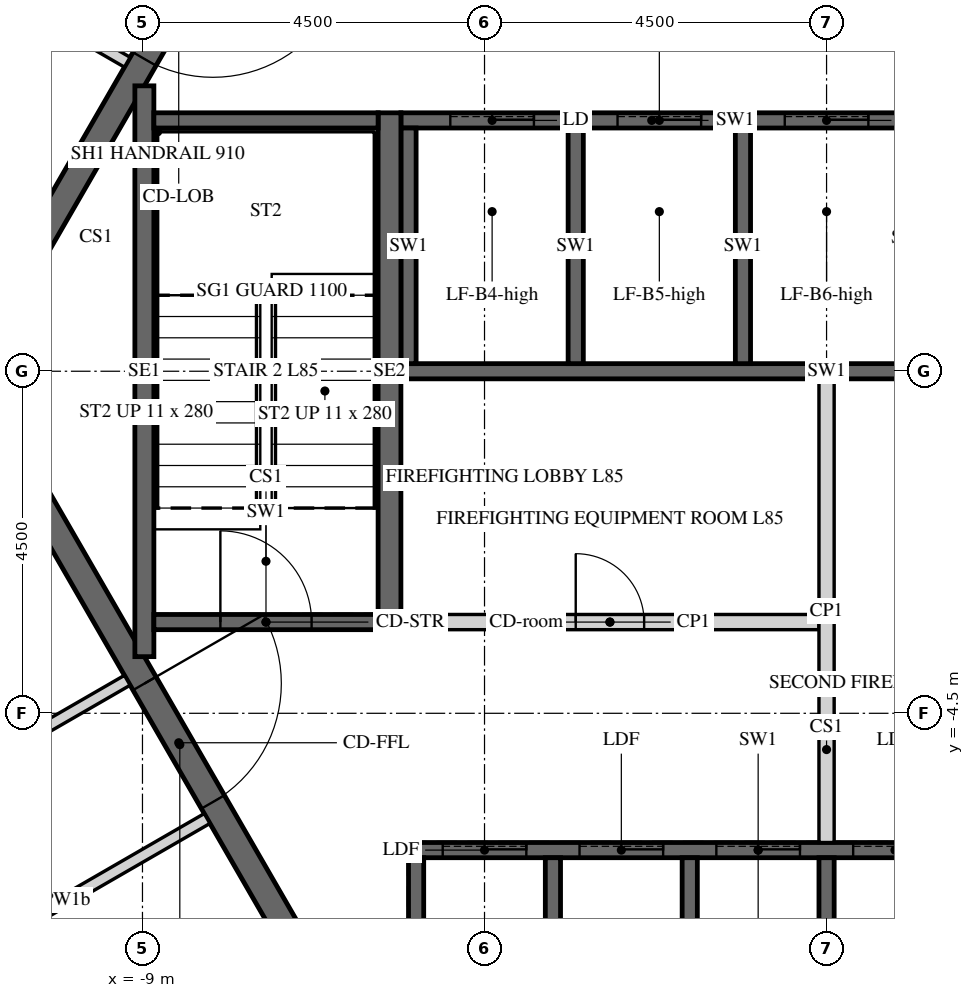
"""IFC4 building model, lengths in metres.
Left out: names, types, materials, properties, quantities, classifications, styles, units other than length and angle.
Written with IfcOpenShell. Run it as: python <this file> out.ifc"""

import sys

from ifc_helpers import new_model, si_unit, direction, frame, frame_2d, origin, place, context, subcontext, project, spatial, polyline, rectangle, outline, extrude, element, fill, save


model = new_model("IFC4")
c1 = context("Model", 3, precision=1e-05, world=origin(), true_north=direction((0.0, 1.0)))
c2 = subcontext(c1, "Body", "Model", "MODEL_VIEW")
j1 = project(units=[si_unit("LENGTHUNIT", "METRE"), si_unit("PLANEANGLEUNIT", "RADIAN")], contexts=[c1])
p1 = place(None, origin())
s1 = spatial("IfcSite", under=j1, at=p1, CompositionType="ELEMENT")
p2 = place(p1, origin())
s2 = spatial("IfcBuilding", under=s1, at=p2, CompositionType="ELEMENT")
p3 = place(p2, frame((0.0, 0.0, 353.4)))
s3 = spatial("IfcBuildingStorey", under=s2, at=p3, CompositionType="ELEMENT", Elevation=353.4)
p4 = place(p3, frame((-5.673, 9.825, -0.15), z_axis=(0.0, 0.0, 1.0), x_axis=(-0.499995046907, -0.866028263435, 0.0)))
e1 = element("IfcWall", 1, at=p4, inside=s3, PredefinedType="SHEAR", context=c2, shape_type="SweptSolid", body=[
    extrude(outline(polyline([(-0.101, -0.175), (11.446, -0.175), (11.244, 0.175), (0.101, 0.175), (-0.101, -0.175)])), origin(), (0.0, 0.0, 1.0), 3.9),
])
p5 = place(p4, frame((4.801, 0.0, 0.15)))
e2 = element("IfcOpeningElement", 2, at=p5, cuts=e1, PredefinedType="OPENING", context=c2, shape_type="SweptSolid", body=[
    extrude(rectangle(XDim=1.8, YDim=2.4, at=frame_2d((0.9, 1.2))), frame((0.0, 0.185, 0.0), z_axis=(0.0, -1.0, 0.0), x_axis=(1.0, 0.0, 0.0)), (0.0, 0.0, 1.0), 0.37),
])
p6 = place(p3, frame((-11.345, 0.0, -0.15), z_axis=(0.0, 0.0, 1.0), x_axis=(0.499995046907, -0.866028263435, 0.0)))
e3 = element("IfcWall", 3, at=p6, inside=s3, PredefinedType="SHEAR", context=c2, shape_type="SweptSolid", body=[
    extrude(outline(polyline([(-0.101, -0.175), (11.446, -0.175), (11.244, 0.175), (0.101, 0.175), (-0.101, -0.175)])), origin(), (0.0, 0.0, 1.0), 3.9),
])
p7 = place(p6, frame((4.744, 0.0, 0.15)))
e4 = element("IfcOpeningElement", 4, at=p7, cuts=e3, PredefinedType="OPENING", context=c2, shape_type="SweptSolid", body=[
    extrude(rectangle(XDim=1.8, YDim=2.4, at=frame_2d((0.9, 1.2))), frame((0.0, 0.185, 0.0), z_axis=(0.0, -1.0, 0.0), x_axis=(1.0, 0.0, 0.0)), (0.0, 0.0, 1.0), 0.37),
])
p8 = place(p3, frame((-5.6, 3.3, -0.25), z_axis=(0.0, 0.0, 1.0), x_axis=(1.0, 0.0, 0.0)))
e5 = element("IfcWall", 5, at=p8, inside=s3, PredefinedType="SHEAR", context=c2, shape_type="SweptSolid", body=[
    extrude(rectangle(XDim=6.6, YDim=0.2, at=frame_2d((3.3, 0.0))), origin(), (0.0, 0.0, 1.0), 3.9),
])
p9 = place(p8, frame((0.65, 0.0, 0.25)))
e6 = element("IfcOpeningElement", 6, at=p9, cuts=e5, PredefinedType="OPENING", context=c2, shape_type="SweptSolid", body=[
    extrude(rectangle(XDim=1.1, YDim=2.1, at=frame_2d((0.55, 1.05))), frame((0.0, 0.11, 0.0), z_axis=(0.0, -1.0, 0.0), x_axis=(1.0, 0.0, 0.0)), (0.0, 0.0, 1.0), 0.22),
])
p10 = place(p8, frame((2.85, 0.0, 0.25)))
e7 = element("IfcOpeningElement", 7, at=p10, cuts=e5, PredefinedType="OPENING", context=c2, shape_type="SweptSolid", body=[
    extrude(rectangle(XDim=1.1, YDim=2.1, at=frame_2d((0.55, 1.05))), frame((0.0, 0.11, 0.0), z_axis=(0.0, -1.0, 0.0), x_axis=(1.0, 0.0, 0.0)), (0.0, 0.0, 1.0), 0.22),
])
p11 = place(p8, frame((5.05, 0.0, 0.25)))
e8 = element("IfcOpeningElement", 8, at=p11, cuts=e5, PredefinedType="OPENING", context=c2, shape_type="SweptSolid", body=[
    extrude(rectangle(XDim=1.1, YDim=2.1, at=frame_2d((0.55, 1.05))), frame((0.0, 0.11, 0.0), z_axis=(0.0, -1.0, 0.0), x_axis=(1.0, 0.0, 0.0)), (0.0, 0.0, 1.0), 0.22),
])
p12 = place(p3, frame((-5.6, 0.0, -0.25), z_axis=(0.0, 0.0, 1.0), x_axis=(1.0, 0.0, 0.0)))
e9 = element("IfcWall", 9, at=p12, inside=s3, PredefinedType="SHEAR", context=c2, shape_type="SweptSolid", body=[
    extrude(rectangle(XDim=11.2, YDim=0.2, at=frame_2d((5.6, 0.0))), origin(), (0.0, 0.0, 1.0), 3.9),
])
for number, where, z_axis, x_axis in (
    (10, (-5.5, 0.1, -0.25), (0.0, 0.0, 1.0), (0.0, 1.0, 0.0)),
    (11, (-3.3, 0.1, -0.25), (0.0, 0.0, 1.0), (0.0, 1.0, 0.0)),
    (12, (-1.1, 0.1, -0.25), (0.0, 0.0, 1.0), (0.0, 1.0, 0.0)),
):
    element("IfcWall", number, at=place(p3, frame(where, z_axis=z_axis, x_axis=x_axis)), inside=s3, PredefinedType="SHEAR", context=c2, shape_type="SweptSolid", body=[
        extrude(rectangle(XDim=3.1, YDim=0.2, at=frame_2d((1.55, 0.0))), origin(), (0.0, 0.0, 1.0), 3.9),
    ])
p13 = place(p3, frame((-5.5, -6.3, -0.25), z_axis=(0.0, 0.0, 1.0), x_axis=(1.0, 0.0, 0.0)))
e13 = element("IfcWall", 13, at=p13, inside=s3, PredefinedType="SHEAR", context=c2, shape_type="SweptSolid", body=[
    extrude(rectangle(XDim=9.2, YDim=0.2, at=frame_2d((4.6, 0.0))), origin(), (0.0, 0.0, 1.0), 3.9),
])
p14 = place(p13, frame((0.45, 0.0, 0.25)))
e14 = element("IfcOpeningElement", 14, at=p14, cuts=e13, PredefinedType="OPENING", context=c2, shape_type="SweptSolid", body=[
    extrude(rectangle(XDim=1.1, YDim=2.1, at=frame_2d((0.55, 1.05))), frame((0.0, 0.11, 0.0), z_axis=(0.0, -1.0, 0.0), x_axis=(1.0, 0.0, 0.0)), (0.0, 0.0, 1.0), 0.22),
])
p15 = place(p13, frame((2.25, 0.0, 0.25)))
e15 = element("IfcOpeningElement", 15, at=p15, cuts=e13, PredefinedType="OPENING", context=c2, shape_type="SweptSolid", body=[
    extrude(rectangle(XDim=1.1, YDim=2.1, at=frame_2d((0.55, 1.05))), frame((0.0, 0.11, 0.0), z_axis=(0.0, -1.0, 0.0), x_axis=(1.0, 0.0, 0.0)), (0.0, 0.0, 1.0), 0.22),
])
p16 = place(p13, frame((4.05, 0.0, 0.25)))
e16 = element("IfcOpeningElement", 16, at=p16, cuts=e13, PredefinedType="OPENING", context=c2, shape_type="SweptSolid", body=[
    extrude(rectangle(XDim=1.1, YDim=2.1, at=frame_2d((0.55, 1.05))), frame((0.0, 0.11, 0.0), z_axis=(0.0, -1.0, 0.0), x_axis=(1.0, 0.0, 0.0)), (0.0, 0.0, 1.0), 0.22),
])
p17 = place(p13, frame((5.85, 0.0, 0.25)))
e17 = element("IfcOpeningElement", 17, at=p17, cuts=e13, PredefinedType="OPENING", context=c2, shape_type="SweptSolid", body=[
    extrude(rectangle(XDim=1.1, YDim=2.1, at=frame_2d((0.55, 1.05))), frame((0.0, 0.11, 0.0), z_axis=(0.0, -1.0, 0.0), x_axis=(1.0, 0.0, 0.0)), (0.0, 0.0, 1.0), 0.22),
])
p18 = place(p13, frame((7.65, 0.0, 0.25)))
e18 = element("IfcOpeningElement", 18, at=p18, cuts=e13, PredefinedType="OPENING", context=c2, shape_type="SweptSolid", body=[
    extrude(rectangle(XDim=1.1, YDim=2.1, at=frame_2d((0.55, 1.05))), frame((0.0, 0.11, 0.0), z_axis=(0.0, -1.0, 0.0), x_axis=(1.0, 0.0, 0.0)), (0.0, 0.0, 1.0), 0.22),
])
for number, where, z_axis, x_axis in (
    (19, (-5.4, -9.3, -0.25), (0.0, 0.0, 1.0), (0.0, 1.0, 0.0)),
    (20, (-3.6, -9.3, -0.25), (0.0, 0.0, 1.0), (0.0, 1.0, 0.0)),
    (21, (-1.8, -9.3, -0.25), (0.0, 0.0, 1.0), (0.0, 1.0, 0.0)),
    (22, (0.0, -9.3, -0.25), (0.0, 0.0, 1.0), (0.0, 1.0, 0.0)),
):
    element("IfcWall", number, at=place(p3, frame(where, z_axis=z_axis, x_axis=x_axis)), inside=s3, PredefinedType="SHEAR", context=c2, shape_type="SweptSolid", body=[
        extrude(rectangle(XDim=2.9, YDim=0.2, at=frame_2d((1.45, 0.0))), origin(), (0.0, 0.0, 1.0), 3.9),
    ])
p19 = place(p3, frame((-5.6, -3.3, 0.0), z_axis=(0.0, 0.0, 1.0), x_axis=(1.0, 0.0, 0.0)))
e23 = element("IfcWall", 23, at=p19, inside=s3, PredefinedType="PARTITIONING", context=c2, shape_type="SweptSolid", body=[
    extrude(rectangle(XDim=5.5, YDim=0.2, at=frame_2d((2.75, 0.0))), origin(), (0.0, 0.0, 1.0), 3.65),
])
p20 = place(p19, frame((2.3, 0.0, 0.0)))
e24 = element("IfcOpeningElement", 24, at=p20, cuts=e23, PredefinedType="OPENING", context=c2, shape_type="SweptSolid", body=[
    extrude(rectangle(XDim=0.9, YDim=2.1, at=frame_2d((0.45, 1.05))), frame((0.0, 0.11, 0.0), z_axis=(0.0, -1.0, 0.0), x_axis=(1.0, 0.0, 0.0)), (0.0, 0.0, 1.0), 0.22),
])
p21 = place(p3, frame((0.0, -6.2, 0.0), z_axis=(0.0, 0.0, 1.0), x_axis=(0.0, 1.0, 0.0)))
e25 = element("IfcWall", 25, at=p21, inside=s3, PredefinedType="PARTITIONING", context=c2, shape_type="SweptSolid", body=[
    extrude(rectangle(XDim=6.1, YDim=0.2, at=frame_2d((3.05, 0.0))), origin(), (0.0, 0.0, 1.0), 3.65),
])
p22 = place(p3, frame((-5.75, -3.4, -0.25), z_axis=(0.0, 0.0, 1.0), x_axis=(0.0, 1.0, 0.0)))
e26 = element("IfcWall", 26, at=p22, inside=s3, PredefinedType="SHEAR", context=c2, shape_type="SweptSolid", body=[
    extrude(rectangle(XDim=6.8, YDim=0.3, at=frame_2d((3.4, 0.0))), origin(), (0.0, 0.0, 1.0), 3.9),
])
p23 = place(p3, frame((-8.975, -3.755, -0.25), z_axis=(0.0, 0.0, 1.0), x_axis=(0.0, 1.0, 0.0)))
e27 = element("IfcWall", 27, at=p23, inside=s3, PredefinedType="SHEAR", context=c2, shape_type="SweptSolid", body=[
    extrude(rectangle(XDim=7.51, YDim=0.25, at=frame_2d((3.755, 0.0))), origin(), (0.0, 0.0, 1.0), 3.9),
])
p24 = place(p3, frame((-8.85, 3.3, -0.25), z_axis=(0.0, 0.0, 1.0), x_axis=(1.0, 0.0, 0.0)))
e28 = element("IfcWall", 28, at=p24, inside=s3, PredefinedType="SHEAR", context=c2, shape_type="SweptSolid", body=[
    extrude(rectangle(XDim=2.95, YDim=0.2, at=frame_2d((1.475, 0.0))), origin(), (0.0, 0.0, 1.0), 3.9),
])
p25 = place(p3, frame((-8.85, -3.3, -0.25), z_axis=(0.0, 0.0, 1.0), x_axis=(1.0, 0.0, 0.0)))
e29 = element("IfcWall", 29, at=p25, inside=s3, PredefinedType="SHEAR", context=c2, shape_type="SweptSolid", body=[
    extrude(rectangle(XDim=2.95, YDim=0.2, at=frame_2d((1.475, 0.0))), origin(), (0.0, 0.0, 1.0), 3.9),
])
p26 = place(p25, frame((0.875, 0.0, 0.25)))
e30 = element("IfcOpeningElement", 30, at=p26, cuts=e29, PredefinedType="OPENING", context=c2, shape_type="SweptSolid", body=[
    extrude(rectangle(XDim=1.2, YDim=2.4, at=frame_2d((0.6, 1.2))), frame((0.0, 0.11, 0.0), z_axis=(0.0, -1.0, 0.0), x_axis=(1.0, 0.0, 0.0)), (0.0, 0.0, 1.0), 0.22),
])
p27 = place(p3, frame((-7.903, 16.075, 0.0), z_axis=(0.0, 0.0, 1.0), x_axis=(-0.438364761272, -0.898797160696, 0.0)))
e31 = element("IfcWall", 31, at=p27, inside=s3, PredefinedType="PARTITIONING", context=c2, shape_type="SweptSolid", body=[
    extrude(rectangle(XDim=15.688, YDim=0.15, at=frame_2d((7.844, 0.0))), origin(), (0.0, 0.0, 1.0), 2.82),
])
p28 = place(p27, frame((2.942, 0.0, 0.0)))
e32 = element("IfcOpeningElement", 32, at=p28, cuts=e31, PredefinedType="OPENING", context=c2, shape_type="SweptSolid", body=[
    extrude(rectangle(XDim=1.0, YDim=2.1, at=frame_2d((0.5, 1.05))), frame((0.0, 0.085, 0.0), z_axis=(0.0, -1.0, 0.0), x_axis=(1.0, 0.0, 0.0)), (0.0, 0.0, 1.0), 0.17),
])
p29 = place(p3, frame((-11.131, 5.18, 0.0), z_axis=(0.0, 0.0, 1.0), x_axis=(0.866037886895, -0.499978377995, 0.0)))
e33 = element("IfcWall", 33, at=p29, inside=s3, PredefinedType="PARTITIONING", context=c2, shape_type="SweptSolid", body=[
    extrude(rectangle(XDim=2.229, YDim=0.15, at=frame_2d((1.115, 0.0))), origin(), (0.0, 0.0, 1.0), 2.82),
])
p30 = place(p3, frame((-17.036, -2.792, 0.0), z_axis=(0.0, 0.0, 1.0), x_axis=(0.500006428338, -0.86602169235, 0.0)))
e34 = element("IfcWall", 34, at=p30, inside=s3, PredefinedType="PARTITIONING", context=c2, shape_type="SweptSolid", body=[
    extrude(rectangle(XDim=13.966, YDim=0.15, at=frame_2d((6.983, 0.0))), origin(), (0.0, 0.0, 1.0), 2.82),
])
p31 = place(p30, frame((3.325, 0.0, 0.0)))
e35 = element("IfcOpeningElement", 35, at=p31, cuts=e34, PredefinedType="OPENING", context=c2, shape_type="SweptSolid", body=[
    extrude(rectangle(XDim=1.0, YDim=2.1, at=frame_2d((0.5, 1.05))), frame((0.0, 0.085, 0.0), z_axis=(0.0, -1.0, 0.0), x_axis=(1.0, 0.0, 0.0)), (0.0, 0.0, 1.0), 0.17),
])
p32 = place(p3, frame((-9.2, -4.066, 0.0), z_axis=(0.0, 0.0, 1.0), x_axis=(-0.866013608182, -0.500020430026, 0.0)))
e36 = element("IfcWall", 36, at=p32, inside=s3, PredefinedType="PARTITIONING", context=c2, shape_type="SweptSolid", body=[
    extrude(rectangle(XDim=4.35, YDim=0.15, at=frame_2d((2.175, 0.0))), origin(), (0.0, 0.0, 1.0), 2.82),
])
p33 = place(p32, frame((1.725, 0.0, 0.0)))
e37 = element("IfcOpeningElement", 37, at=p33, cuts=e36, PredefinedType="OPENING", context=c2, shape_type="SweptSolid", body=[
    extrude(rectangle(XDim=0.9, YDim=2.1, at=frame_2d((0.45, 1.05))), frame((0.0, 0.085, 0.0), z_axis=(0.0, -1.0, 0.0), x_axis=(1.0, 0.0, 0.0)), (0.0, 0.0, 1.0), 0.17),
])
p34 = place(p3, frame((-11.852, -8.022, 0.0), z_axis=(0.0, 0.0, 1.0), x_axis=(0.866038183914, 0.499977863513, 0.0)))
e38 = element("IfcWall", 38, at=p34, inside=s3, PredefinedType="PARTITIONING", context=c2, shape_type="SweptSolid", body=[
    extrude(rectangle(XDim=4.275, YDim=0.15, at=frame_2d((2.138, 0.0))), origin(), (0.0, 0.0, 1.0), 2.82),
])
p35 = place(p5, origin())
e39 = element("IfcDoor", 39, at=p35, inside=s3, OperationType="DOUBLE_DOOR_SINGLE_SWING", PredefinedType="DOOR", context=c2, shape_type="SweptSolid", body=[
    extrude(rectangle(XDim=1.8, YDim=2.4, at=frame_2d((0.9, 1.2))), frame((0.0, 0.025, 0.0), z_axis=(0.0, -1.0, 0.0), x_axis=(1.0, 0.0, 0.0)), (0.0, 0.0, 1.0), 0.05),
])
fill(e2, e39)
p36 = place(p7, origin())
e40 = element("IfcDoor", 40, at=p36, inside=s3, OperationType="DOUBLE_DOOR_SINGLE_SWING", PredefinedType="DOOR", context=c2, shape_type="SweptSolid", body=[
    extrude(rectangle(XDim=1.8, YDim=2.4, at=frame_2d((0.9, 1.2))), frame((0.0, 0.025, 0.0), z_axis=(0.0, -1.0, 0.0), x_axis=(1.0, 0.0, 0.0)), (0.0, 0.0, 1.0), 0.05),
])
fill(e4, e40)
p37 = place(p20, origin())
e41 = element("IfcDoor", 41, at=p37, inside=s3, OperationType="SINGLE_SWING_LEFT", PredefinedType="DOOR", context=c2, shape_type="SweptSolid", body=[
    extrude(rectangle(XDim=0.9, YDim=2.1, at=frame_2d((0.45, 1.05))), frame((0.0, 0.025, 0.0), z_axis=(0.0, -1.0, 0.0), x_axis=(1.0, 0.0, 0.0)), (0.0, 0.0, 1.0), 0.05),
])
fill(e24, e41)
p38 = place(p26, origin())
e42 = element("IfcDoor", 42, at=p38, inside=s3, OperationType="SINGLE_SWING_LEFT", PredefinedType="DOOR", context=c2, shape_type="SweptSolid", body=[
    extrude(rectangle(XDim=1.2, YDim=2.4, at=frame_2d((0.6, 1.2))), frame((0.0, 0.025, 0.0), z_axis=(0.0, -1.0, 0.0), x_axis=(1.0, 0.0, 0.0)), (0.0, 0.0, 1.0), 0.05),
])
fill(e30, e42)
p39 = place(p9, origin())
e43 = element("IfcDoor", 43, at=p39, inside=s3, OperationType="SLIDING_TO_LEFT", PredefinedType="DOOR", context=c2, shape_type="SweptSolid", body=[
    extrude(rectangle(XDim=1.1, YDim=2.1, at=frame_2d((0.55, 1.05))), frame((0.0, 0.025, 0.0), z_axis=(0.0, -1.0, 0.0), x_axis=(1.0, 0.0, 0.0)), (0.0, 0.0, 1.0), 0.05),
])
fill(e6, e43)
p40 = place(p10, origin())
e44 = element("IfcDoor", 44, at=p40, inside=s3, OperationType="SLIDING_TO_LEFT", PredefinedType="DOOR", context=c2, shape_type="SweptSolid", body=[
    extrude(rectangle(XDim=1.1, YDim=2.1, at=frame_2d((0.55, 1.05))), frame((0.0, 0.025, 0.0), z_axis=(0.0, -1.0, 0.0), x_axis=(1.0, 0.0, 0.0)), (0.0, 0.0, 1.0), 0.05),
])
fill(e7, e44)
p41 = place(p11, origin())
e45 = element("IfcDoor", 45, at=p41, inside=s3, OperationType="SLIDING_TO_LEFT", PredefinedType="DOOR", context=c2, shape_type="SweptSolid", body=[
    extrude(rectangle(XDim=1.1, YDim=2.1, at=frame_2d((0.55, 1.05))), frame((0.0, 0.025, 0.0), z_axis=(0.0, -1.0, 0.0), x_axis=(1.0, 0.0, 0.0)), (0.0, 0.0, 1.0), 0.05),
])
fill(e8, e45)
p42 = place(p14, origin())
e46 = element("IfcDoor", 46, at=p42, inside=s3, OperationType="SLIDING_TO_LEFT", PredefinedType="DOOR", context=c2, shape_type="SweptSolid", body=[
    extrude(rectangle(XDim=1.1, YDim=2.1, at=frame_2d((0.55, 1.05))), frame((0.0, 0.025, 0.0), z_axis=(0.0, -1.0, 0.0), x_axis=(1.0, 0.0, 0.0)), (0.0, 0.0, 1.0), 0.05),
])
fill(e14, e46)
p43 = place(p15, origin())
e47 = element("IfcDoor", 47, at=p43, inside=s3, OperationType="SLIDING_TO_LEFT", PredefinedType="DOOR", context=c2, shape_type="SweptSolid", body=[
    extrude(rectangle(XDim=1.1, YDim=2.1, at=frame_2d((0.55, 1.05))), frame((0.0, 0.025, 0.0), z_axis=(0.0, -1.0, 0.0), x_axis=(1.0, 0.0, 0.0)), (0.0, 0.0, 1.0), 0.05),
])
fill(e15, e47)
p44 = place(p16, origin())
e48 = element("IfcDoor", 48, at=p44, inside=s3, OperationType="SLIDING_TO_LEFT", PredefinedType="DOOR", context=c2, shape_type="SweptSolid", body=[
    extrude(rectangle(XDim=1.1, YDim=2.1, at=frame_2d((0.55, 1.05))), frame((0.0, 0.025, 0.0), z_axis=(0.0, -1.0, 0.0), x_axis=(1.0, 0.0, 0.0)), (0.0, 0.0, 1.0), 0.05),
])
fill(e16, e48)
p45 = place(p17, origin())
e49 = element("IfcDoor", 49, at=p45, inside=s3, OperationType="SLIDING_TO_LEFT", PredefinedType="DOOR", context=c2, shape_type="SweptSolid", body=[
    extrude(rectangle(XDim=1.1, YDim=2.1, at=frame_2d((0.55, 1.05))), frame((0.0, 0.025, 0.0), z_axis=(0.0, -1.0, 0.0), x_axis=(1.0, 0.0, 0.0)), (0.0, 0.0, 1.0), 0.05),
])
fill(e17, e49)
save(model, sys.argv[1])
